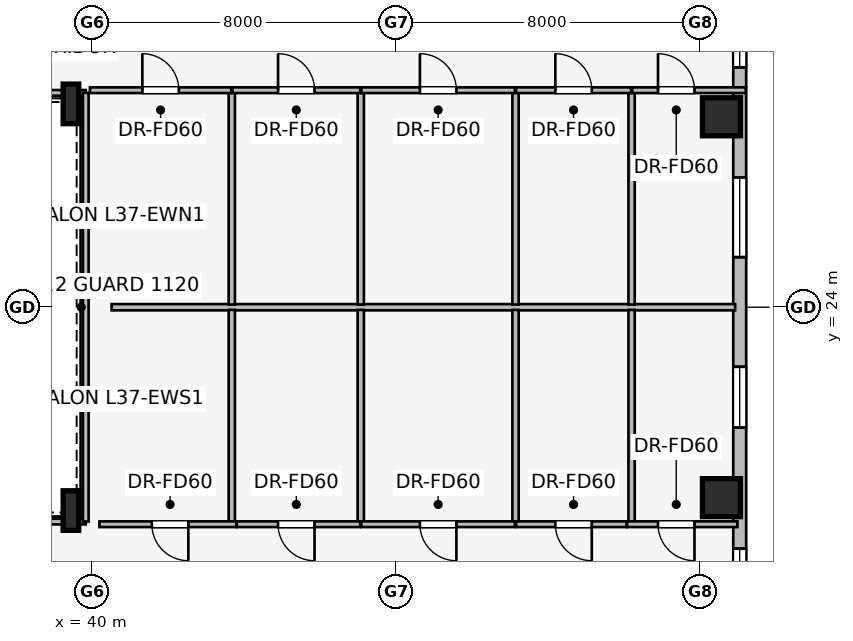
"""IFC4 building model, lengths in metres.
Left out: names, types, materials, properties, quantities, classifications, styles, units other than length and angle.
Written with IfcOpenShell. Run it as: python <this file> out.ifc"""

import sys

from ifc_helpers import new_model, si_unit, direction, frame, frame_2d, origin, origin_2d, place, context, subcontext, project, spatial, rectangle, i_section, extrude, element, fill, save


model = new_model("IFC4")
c1 = context("Model", 3, precision=1e-05, world=origin(), true_north=direction((0.0, 1.0)))
c2 = subcontext(c1, "Body", "Model", "MODEL_VIEW")
j1 = project(units=[si_unit("LENGTHUNIT", "METRE"), si_unit("PLANEANGLEUNIT", "RADIAN")], contexts=[c1])
p1 = place(None, origin())
s1 = spatial("IfcSite", under=j1, at=p1, CompositionType="ELEMENT")
p2 = place(p1, origin())
s2 = spatial("IfcBuilding", under=s1, at=p2, CompositionType="ELEMENT")
p3 = place(p2, frame((0.0, 0.0, 139.5)))
s3 = spatial("IfcBuildingStorey", under=s2, at=p3, CompositionType="ELEMENT", Elevation=139.5)
for number, where, z_axis, x_axis in (
    (1, (56.568, 18.989, 0.0), (0.0, 0.0, 1.0), (1.0, 0.0, 0.0)),
    (2, (56.568, 29.011, 0.0), (0.0, 0.0, 1.0), (1.0, 0.0, 0.0)),
):
    element("IfcColumn", number, at=place(p3, frame(where, z_axis=z_axis, x_axis=x_axis)), inside=s3, PredefinedType="COLUMN", context=c2, shape_type="SweptSolid", body=[
        extrude(rectangle(XDim=1.0, YDim=1.0, at=origin_2d()), origin(), (0.0, 0.0, 1.0), 3.45),
    ])
for number, where, z_axis, x_axis in (
    (3, (39.45, 18.65, 0.0), (0.0, 0.0, 1.0), (1.0, 0.0, 0.0)),
    (4, (39.45, 29.35, 0.0), (0.0, 0.0, 1.0), (1.0, 0.0, 0.0)),
):
    element("IfcColumn", number, at=place(p3, frame(where, z_axis=z_axis, x_axis=x_axis)), inside=s3, PredefinedType="COLUMN", context=c2, shape_type="SweptSolid", body=[
        extrude(i_section(OverallWidth=0.41, OverallDepth=1.041, WebThickness=0.031, FlangeThickness=0.056, at=origin_2d()), origin(), (0.0, 0.0, 1.0), 3.45),
    ])
p4 = place(p3, frame((57.048, 32.352, 0.0), z_axis=(0.0, 0.0, 1.0), x_axis=(0.0, -1.0, 0.0)))
e5 = element("IfcWall", 5, at=p4, inside=s3, PredefinedType="STANDARD", context=c2, shape_type="SweptSolid", body=[
    extrude(rectangle(XDim=16.704, YDim=0.34, at=frame_2d((8.352, 0.0))), origin(), (0.0, 0.0, 1.0), 3.16),
])
p5 = place(p4, frame((0.992, 0.0, 0.75)))
e6 = element("IfcOpeningElement", 6, at=p5, cuts=e5, PredefinedType="OPENING", context=c2, shape_type="SweptSolid", body=[
    extrude(rectangle(XDim=1.05, YDim=1.4, at=frame_2d((0.525, 0.7))), frame((0.0, 0.18, 0.0), z_axis=(0.0, -1.0, 0.0), x_axis=(1.0, 0.0, 0.0)), (0.0, 0.0, 1.0), 0.36),
])
p6 = place(p4, frame((4.935, 0.0, 0.75)))
e7 = element("IfcOpeningElement", 7, at=p6, cuts=e5, PredefinedType="OPENING", context=c2, shape_type="SweptSolid", body=[
    extrude(rectangle(XDim=2.1, YDim=1.5, at=frame_2d((1.05, 0.75))), frame((0.0, 0.18, 0.0), z_axis=(0.0, -1.0, 0.0), x_axis=(1.0, 0.0, 0.0)), (0.0, 0.0, 1.0), 0.36),
])
p7 = place(p4, frame((9.919, 0.0, 0.75)))
e8 = element("IfcOpeningElement", 8, at=p7, cuts=e5, PredefinedType="OPENING", context=c2, shape_type="SweptSolid", body=[
    extrude(rectangle(XDim=1.6, YDim=1.55, at=frame_2d((0.8, 0.775))), frame((0.0, 0.18, 0.0), z_axis=(0.0, -1.0, 0.0), x_axis=(1.0, 0.0, 0.0)), (0.0, 0.0, 1.0), 0.36),
])
p8 = place(p4, frame((14.702, 0.0, 0.75)))
e9 = element("IfcOpeningElement", 9, at=p8, cuts=e5, PredefinedType="OPENING", context=c2, shape_type="SweptSolid", body=[
    extrude(rectangle(XDim=1.05, YDim=1.4, at=frame_2d((0.525, 0.7))), frame((0.0, 0.18, 0.0), z_axis=(0.0, -1.0, 0.0), x_axis=(1.0, 0.0, 0.0)), (0.0, 0.0, 1.0), 0.36),
])
p9 = place(p3, frame((27.675, 18.36, 0.0), z_axis=(0.0, 0.0, 1.0), x_axis=(1.0, 0.0, 0.0)))
e10 = element("IfcWall", 10, at=p9, inside=s3, PredefinedType="PARTITIONING", context=c2, shape_type="SweptSolid", body=[
    extrude(rectangle(XDim=12.165, YDim=0.15, at=frame_2d((6.083, 0.0))), origin(), (0.0, 0.0, 1.0), 2.301),
])
p10 = place(p3, frame((39.84, 29.64, 0.0), z_axis=(0.0, 0.0, 1.0), x_axis=(-1.0, 0.0, 0.0)))
e11 = element("IfcWall", 11, at=p10, inside=s3, PredefinedType="PARTITIONING", context=c2, shape_type="SweptSolid", body=[
    extrude(rectangle(XDim=12.2, YDim=0.15, at=frame_2d((6.1, 0.0))), origin(), (0.0, 0.0, 1.0), 2.301),
])
p11 = place(p3, frame((39.84, 18.36, 0.0), z_axis=(0.0, 0.0, 1.0), x_axis=(0.0, 1.0, 0.0)))
e12 = element("IfcWall", 12, at=p11, inside=s3, PredefinedType="PARTITIONING", context=c2, shape_type="SweptSolid", body=[
    extrude(rectangle(XDim=11.28, YDim=0.15, at=frame_2d((5.64, 0.0))), origin(), (0.0, 0.0, 1.0), 3.16),
])
p12 = place(p3, frame((40.52, 24.0, 0.0), z_axis=(0.0, 0.0, 1.0), x_axis=(1.0, 0.0, 0.0)))
e13 = element("IfcWall", 13, at=p12, inside=s3, PredefinedType="PARTITIONING", context=c2, shape_type="SweptSolid", body=[
    extrude(rectangle(XDim=16.408, YDim=0.165, at=frame_2d((8.204, 0.0))), origin(), (0.0, 0.0, 1.0), 3.16),
])
for number, where, z_axis, x_axis in (
    (14, (43.683, 24.07, 0.0), (0.0, 0.0, 1.0), (0.0, 1.0, 0.0)),
    (15, (47.077, 24.07, 0.0), (0.0, 0.0, 1.0), (0.0, 1.0, 0.0)),
    (16, (51.149, 24.07, 0.0), (0.0, 0.0, 1.0), (0.0, 1.0, 0.0)),
    (17, (54.203, 24.07, 0.0), (0.0, 0.0, 1.0), (0.0, 1.0, 0.0)),
):
    element("IfcWall", number, at=place(p3, frame(where, z_axis=z_axis, x_axis=x_axis)), inside=s3, PredefinedType="PARTITIONING", context=c2, shape_type="SweptSolid", body=[
        extrude(rectangle(XDim=5.64, YDim=0.165, at=frame_2d((2.82, 0.0))), origin(), (0.0, 0.0, 1.0), 3.16),
    ])
p13 = place(p3, frame((39.95, 29.71, 0.0), z_axis=(0.0, 0.0, 1.0), x_axis=(1.0, 0.0, 0.0)))
e18 = element("IfcWall", 18, at=p13, inside=s3, PredefinedType="PARTITIONING", context=c2, shape_type="SweptSolid", body=[
    extrude(rectangle(XDim=3.718, YDim=0.15, at=frame_2d((1.859, 0.0))), origin(), (0.0, 0.0, 1.0), 3.16),
])
p14 = place(p13, frame((1.379, 0.0, 0.0)))
e19 = element("IfcOpeningElement", 19, at=p14, cuts=e18, PredefinedType="OPENING", context=c2, shape_type="SweptSolid", body=[
    extrude(rectangle(XDim=0.96, YDim=2.0, at=frame_2d((0.48, 1.0))), frame((0.0, 0.085, 0.0), z_axis=(0.0, -1.0, 0.0), x_axis=(1.0, 0.0, 0.0)), (0.0, 0.0, 1.0), 0.17),
])
p15 = place(p3, frame((43.698, 29.71, 0.0), z_axis=(0.0, 0.0, 1.0), x_axis=(1.0, 0.0, 0.0)))
e20 = element("IfcWall", 20, at=p15, inside=s3, PredefinedType="PARTITIONING", context=c2, shape_type="SweptSolid", body=[
    extrude(rectangle(XDim=3.364, YDim=0.15, at=frame_2d((1.682, 0.0))), origin(), (0.0, 0.0, 1.0), 3.16),
])
p16 = place(p15, frame((1.202, 0.0, 0.0)))
e21 = element("IfcOpeningElement", 21, at=p16, cuts=e20, PredefinedType="OPENING", context=c2, shape_type="SweptSolid", body=[
    extrude(rectangle(XDim=0.96, YDim=2.0, at=frame_2d((0.48, 1.0))), frame((0.0, 0.085, 0.0), z_axis=(0.0, -1.0, 0.0), x_axis=(1.0, 0.0, 0.0)), (0.0, 0.0, 1.0), 0.17),
])
p17 = place(p3, frame((47.092, 29.71, 0.0), z_axis=(0.0, 0.0, 1.0), x_axis=(1.0, 0.0, 0.0)))
e22 = element("IfcWall", 22, at=p17, inside=s3, PredefinedType="PARTITIONING", context=c2, shape_type="SweptSolid", body=[
    extrude(rectangle(XDim=4.042, YDim=0.15, at=frame_2d((2.021, 0.0))), origin(), (0.0, 0.0, 1.0), 3.16),
])
p18 = place(p17, frame((1.541, 0.0, 0.0)))
e23 = element("IfcOpeningElement", 23, at=p18, cuts=e22, PredefinedType="OPENING", context=c2, shape_type="SweptSolid", body=[
    extrude(rectangle(XDim=0.96, YDim=2.0, at=frame_2d((0.48, 1.0))), frame((0.0, 0.085, 0.0), z_axis=(0.0, -1.0, 0.0), x_axis=(1.0, 0.0, 0.0)), (0.0, 0.0, 1.0), 0.17),
])
p19 = place(p3, frame((51.164, 29.71, 0.0), z_axis=(0.0, 0.0, 1.0), x_axis=(1.0, 0.0, 0.0)))
e24 = element("IfcWall", 24, at=p19, inside=s3, PredefinedType="PARTITIONING", context=c2, shape_type="SweptSolid", body=[
    extrude(rectangle(XDim=3.024, YDim=0.15, at=frame_2d((1.512, 0.0))), origin(), (0.0, 0.0, 1.0), 3.16),
])
p20 = place(p19, frame((1.032, 0.0, 0.0)))
e25 = element("IfcOpeningElement", 25, at=p20, cuts=e24, PredefinedType="OPENING", context=c2, shape_type="SweptSolid", body=[
    extrude(rectangle(XDim=0.96, YDim=2.0, at=frame_2d((0.48, 1.0))), frame((0.0, 0.085, 0.0), z_axis=(0.0, -1.0, 0.0), x_axis=(1.0, 0.0, 0.0)), (0.0, 0.0, 1.0), 0.17),
])
p21 = place(p3, frame((54.218, 29.71, 0.0), z_axis=(0.0, 0.0, 1.0), x_axis=(1.0, 0.0, 0.0)))
e26 = element("IfcWall", 26, at=p21, inside=s3, PredefinedType="PARTITIONING", context=c2, shape_type="SweptSolid", body=[
    extrude(rectangle(XDim=2.99, YDim=0.15, at=frame_2d((1.495, 0.0))), origin(), (0.0, 0.0, 1.0), 3.16),
])
p22 = place(p21, frame((0.68, 0.0, 0.0)))
e27 = element("IfcOpeningElement", 27, at=p22, cuts=e26, PredefinedType="OPENING", context=c2, shape_type="SweptSolid", body=[
    extrude(rectangle(XDim=0.96, YDim=2.0, at=frame_2d((0.48, 1.0))), frame((0.0, 0.085, 0.0), z_axis=(0.0, -1.0, 0.0), x_axis=(1.0, 0.0, 0.0)), (0.0, 0.0, 1.0), 0.17),
])
for number, where, z_axis, x_axis in (
    (28, (43.683, 18.29, 0.0), (0.0, 0.0, 1.0), (0.0, 1.0, 0.0)),
    (29, (47.077, 18.29, 0.0), (0.0, 0.0, 1.0), (0.0, 1.0, 0.0)),
    (30, (51.149, 18.29, 0.0), (0.0, 0.0, 1.0), (0.0, 1.0, 0.0)),
    (31, (54.203, 18.29, 0.0), (0.0, 0.0, 1.0), (0.0, 1.0, 0.0)),
):
    element("IfcWall", number, at=place(p3, frame(where, z_axis=z_axis, x_axis=x_axis)), inside=s3, PredefinedType="PARTITIONING", context=c2, shape_type="SweptSolid", body=[
        extrude(rectangle(XDim=5.64, YDim=0.165, at=frame_2d((2.82, 0.0))), origin(), (0.0, 0.0, 1.0), 3.16),
    ])
p23 = place(p3, frame((43.803, 18.29, 0.0), z_axis=(0.0, 0.0, 1.0), x_axis=(-1.0, 0.0, 0.0)))
e32 = element("IfcWall", 32, at=p23, inside=s3, PredefinedType="PARTITIONING", context=c2, shape_type="SweptSolid", body=[
    extrude(rectangle(XDim=3.603, YDim=0.15, at=frame_2d((1.802, 0.0))), origin(), (0.0, 0.0, 1.0), 3.16),
])
p24 = place(p23, frame((1.264, 0.0, 0.0)))
e33 = element("IfcOpeningElement", 33, at=p24, cuts=e32, PredefinedType="OPENING", context=c2, shape_type="SweptSolid", body=[
    extrude(rectangle(XDim=0.96, YDim=2.0, at=frame_2d((0.48, 1.0))), frame((0.0, 0.085, 0.0), z_axis=(0.0, -1.0, 0.0), x_axis=(1.0, 0.0, 0.0)), (0.0, 0.0, 1.0), 0.17),
])
p25 = place(p3, frame((47.062, 18.29, 0.0), z_axis=(0.0, 0.0, 1.0), x_axis=(-1.0, 0.0, 0.0)))
e34 = element("IfcWall", 34, at=p25, inside=s3, PredefinedType="PARTITIONING", context=c2, shape_type="SweptSolid", body=[
    extrude(rectangle(XDim=3.249, YDim=0.15, at=frame_2d((1.625, 0.0))), origin(), (0.0, 0.0, 1.0), 3.16),
])
p26 = place(p25, frame((1.202, 0.0, 0.0)))
e35 = element("IfcOpeningElement", 35, at=p26, cuts=e34, PredefinedType="OPENING", context=c2, shape_type="SweptSolid", body=[
    extrude(rectangle(XDim=0.96, YDim=2.0, at=frame_2d((0.48, 1.0))), frame((0.0, 0.085, 0.0), z_axis=(0.0, -1.0, 0.0), x_axis=(1.0, 0.0, 0.0)), (0.0, 0.0, 1.0), 0.17),
])
p27 = place(p3, frame((51.134, 18.29, 0.0), z_axis=(0.0, 0.0, 1.0), x_axis=(-1.0, 0.0, 0.0)))
e36 = element("IfcWall", 36, at=p27, inside=s3, PredefinedType="PARTITIONING", context=c2, shape_type="SweptSolid", body=[
    extrude(rectangle(XDim=4.042, YDim=0.15, at=frame_2d((2.021, 0.0))), origin(), (0.0, 0.0, 1.0), 3.16),
])
p28 = place(p27, frame((1.541, 0.0, 0.0)))
e37 = element("IfcOpeningElement", 37, at=p28, cuts=e36, PredefinedType="OPENING", context=c2, shape_type="SweptSolid", body=[
    extrude(rectangle(XDim=0.96, YDim=2.0, at=frame_2d((0.48, 1.0))), frame((0.0, 0.085, 0.0), z_axis=(0.0, -1.0, 0.0), x_axis=(1.0, 0.0, 0.0)), (0.0, 0.0, 1.0), 0.17),
])
p29 = place(p3, frame((54.073, 18.29, 0.0), z_axis=(0.0, 0.0, 1.0), x_axis=(-1.0, 0.0, 0.0)))
e38 = element("IfcWall", 38, at=p29, inside=s3, PredefinedType="PARTITIONING", context=c2, shape_type="SweptSolid", body=[
    extrude(rectangle(XDim=2.909, YDim=0.15, at=frame_2d((1.455, 0.0))), origin(), (0.0, 0.0, 1.0), 3.16),
])
p30 = place(p29, frame((0.917, 0.0, 0.0)))
e39 = element("IfcOpeningElement", 39, at=p30, cuts=e38, PredefinedType="OPENING", context=c2, shape_type="SweptSolid", body=[
    extrude(rectangle(XDim=0.96, YDim=2.0, at=frame_2d((0.48, 1.0))), frame((0.0, 0.085, 0.0), z_axis=(0.0, -1.0, 0.0), x_axis=(1.0, 0.0, 0.0)), (0.0, 0.0, 1.0), 0.17),
])
p31 = place(p3, frame((56.988, 18.29, 0.0), z_axis=(0.0, 0.0, 1.0), x_axis=(-1.0, 0.0, 0.0)))
e40 = element("IfcWall", 40, at=p31, inside=s3, PredefinedType="PARTITIONING", context=c2, shape_type="SweptSolid", body=[
    extrude(rectangle(XDim=2.905, YDim=0.15, at=frame_2d((1.453, 0.0))), origin(), (0.0, 0.0, 1.0), 3.16),
])
p32 = place(p31, frame((1.13, 0.0, 0.0)))
e41 = element("IfcOpeningElement", 41, at=p32, cuts=e40, PredefinedType="OPENING", context=c2, shape_type="SweptSolid", body=[
    extrude(rectangle(XDim=0.96, YDim=2.0, at=frame_2d((0.48, 1.0))), frame((0.0, 0.085, 0.0), z_axis=(0.0, -1.0, 0.0), x_axis=(1.0, 0.0, 0.0)), (0.0, 0.0, 1.0), 0.17),
])
p33 = place(p5, origin())
e42 = element("IfcWindow", 42, at=p33, inside=s3, PartitioningType="SINGLE_PANEL", PredefinedType="WINDOW", context=c2, shape_type="SweptSolid", body=[
    extrude(rectangle(XDim=1.05, YDim=1.4, at=frame_2d((0.525, 0.7))), frame((0.0, 0.03, 0.0), z_axis=(0.0, -1.0, 0.0), x_axis=(1.0, 0.0, 0.0)), (0.0, 0.0, 1.0), 0.06),
])
fill(e6, e42)
p34 = place(p6, origin())
e43 = element("IfcWindow", 43, at=p34, inside=s3, PartitioningType="SINGLE_PANEL", PredefinedType="WINDOW", context=c2, shape_type="SweptSolid", body=[
    extrude(rectangle(XDim=2.1, YDim=1.5, at=frame_2d((1.05, 0.75))), frame((0.0, 0.03, 0.0), z_axis=(0.0, -1.0, 0.0), x_axis=(1.0, 0.0, 0.0)), (0.0, 0.0, 1.0), 0.06),
])
fill(e7, e43)
p35 = place(p7, origin())
e44 = element("IfcWindow", 44, at=p35, inside=s3, PartitioningType="SINGLE_PANEL", PredefinedType="WINDOW", context=c2, shape_type="SweptSolid", body=[
    extrude(rectangle(XDim=1.6, YDim=1.55, at=frame_2d((0.8, 0.775))), frame((0.0, 0.03, 0.0), z_axis=(0.0, -1.0, 0.0), x_axis=(1.0, 0.0, 0.0)), (0.0, 0.0, 1.0), 0.06),
])
fill(e8, e44)
p36 = place(p8, origin())
e45 = element("IfcWindow", 45, at=p36, inside=s3, PartitioningType="SINGLE_PANEL", PredefinedType="WINDOW", context=c2, shape_type="SweptSolid", body=[
    extrude(rectangle(XDim=1.05, YDim=1.4, at=frame_2d((0.525, 0.7))), frame((0.0, 0.03, 0.0), z_axis=(0.0, -1.0, 0.0), x_axis=(1.0, 0.0, 0.0)), (0.0, 0.0, 1.0), 0.06),
])
fill(e9, e45)
p37 = place(p14, origin())
e46 = element("IfcDoor", 46, at=p37, inside=s3, OperationType="SINGLE_SWING_LEFT", PredefinedType="DOOR", context=c2, shape_type="SweptSolid", body=[
    extrude(rectangle(XDim=0.96, YDim=2.0, at=frame_2d((0.48, 1.0))), frame((0.0, 0.025, 0.0), z_axis=(0.0, -1.0, 0.0), x_axis=(1.0, 0.0, 0.0)), (0.0, 0.0, 1.0), 0.05),
])
fill(e19, e46)
p38 = place(p16, origin())
e47 = element("IfcDoor", 47, at=p38, inside=s3, OperationType="SINGLE_SWING_LEFT", PredefinedType="DOOR", context=c2, shape_type="SweptSolid", body=[
    extrude(rectangle(XDim=0.96, YDim=2.0, at=frame_2d((0.48, 1.0))), frame((0.0, 0.025, 0.0), z_axis=(0.0, -1.0, 0.0), x_axis=(1.0, 0.0, 0.0)), (0.0, 0.0, 1.0), 0.05),
])
fill(e21, e47)
p39 = place(p18, origin())
e48 = element("IfcDoor", 48, at=p39, inside=s3, OperationType="SINGLE_SWING_LEFT", PredefinedType="DOOR", context=c2, shape_type="SweptSolid", body=[
    extrude(rectangle(XDim=0.96, YDim=2.0, at=frame_2d((0.48, 1.0))), frame((0.0, 0.025, 0.0), z_axis=(0.0, -1.0, 0.0), x_axis=(1.0, 0.0, 0.0)), (0.0, 0.0, 1.0), 0.05),
])
fill(e23, e48)
p40 = place(p20, origin())
e49 = element("IfcDoor", 49, at=p40, inside=s3, OperationType="SINGLE_SWING_LEFT", PredefinedType="DOOR", context=c2, shape_type="SweptSolid", body=[
    extrude(rectangle(XDim=0.96, YDim=2.0, at=frame_2d((0.48, 1.0))), frame((0.0, 0.025, 0.0), z_axis=(0.0, -1.0, 0.0), x_axis=(1.0, 0.0, 0.0)), (0.0, 0.0, 1.0), 0.05),
])
fill(e25, e49)
p41 = place(p22, origin())
e50 = element("IfcDoor", 50, at=p41, inside=s3, OperationType="SINGLE_SWING_LEFT", PredefinedType="DOOR", context=c2, shape_type="SweptSolid", body=[
    extrude(rectangle(XDim=0.96, YDim=2.0, at=frame_2d((0.48, 1.0))), frame((0.0, 0.025, 0.0), z_axis=(0.0, -1.0, 0.0), x_axis=(1.0, 0.0, 0.0)), (0.0, 0.0, 1.0), 0.05),
])
fill(e27, e50)
p42 = place(p24, origin())
e51 = element("IfcDoor", 51, at=p42, inside=s3, OperationType="SINGLE_SWING_LEFT", PredefinedType="DOOR", context=c2, shape_type="SweptSolid", body=[
    extrude(rectangle(XDim=0.96, YDim=2.0, at=frame_2d((0.48, 1.0))), frame((0.0, 0.025, 0.0), z_axis=(0.0, -1.0, 0.0), x_axis=(1.0, 0.0, 0.0)), (0.0, 0.0, 1.0), 0.05),
])
fill(e33, e51)
p43 = place(p26, origin())
e52 = element("IfcDoor", 52, at=p43, inside=s3, OperationType="SINGLE_SWING_LEFT", PredefinedType="DOOR", context=c2, shape_type="SweptSolid", body=[
    extrude(rectangle(XDim=0.96, YDim=2.0, at=frame_2d((0.48, 1.0))), frame((0.0, 0.025, 0.0), z_axis=(0.0, -1.0, 0.0), x_axis=(1.0, 0.0, 0.0)), (0.0, 0.0, 1.0), 0.05),
])
fill(e35, e52)
p44 = place(p28, origin())
e53 = element("IfcDoor", 53, at=p44, inside=s3, OperationType="SINGLE_SWING_LEFT", PredefinedType="DOOR", context=c2, shape_type="SweptSolid", body=[
    extrude(rectangle(XDim=0.96, YDim=2.0, at=frame_2d((0.48, 1.0))), frame((0.0, 0.025, 0.0), z_axis=(0.0, -1.0, 0.0), x_axis=(1.0, 0.0, 0.0)), (0.0, 0.0, 1.0), 0.05),
])
fill(e37, e53)
p45 = place(p30, origin())
e54 = element("IfcDoor", 54, at=p45, inside=s3, OperationType="SINGLE_SWING_LEFT", PredefinedType="DOOR", context=c2, shape_type="SweptSolid", body=[
    extrude(rectangle(XDim=0.96, YDim=2.0, at=frame_2d((0.48, 1.0))), frame((0.0, 0.025, 0.0), z_axis=(0.0, -1.0, 0.0), x_axis=(1.0, 0.0, 0.0)), (0.0, 0.0, 1.0), 0.05),
])
fill(e39, e54)
p46 = place(p32, origin())
e55 = element("IfcDoor", 55, at=p46, inside=s3, OperationType="SINGLE_SWING_LEFT", PredefinedType="DOOR", context=c2, shape_type="SweptSolid", body=[
    extrude(rectangle(XDim=0.96, YDim=2.0, at=frame_2d((0.48, 1.0))), frame((0.0, 0.025, 0.0), z_axis=(0.0, -1.0, 0.0), x_axis=(1.0, 0.0, 0.0)), (0.0, 0.0, 1.0), 0.05),
])
fill(e41, e55)
save(model, sys.argv[1])
